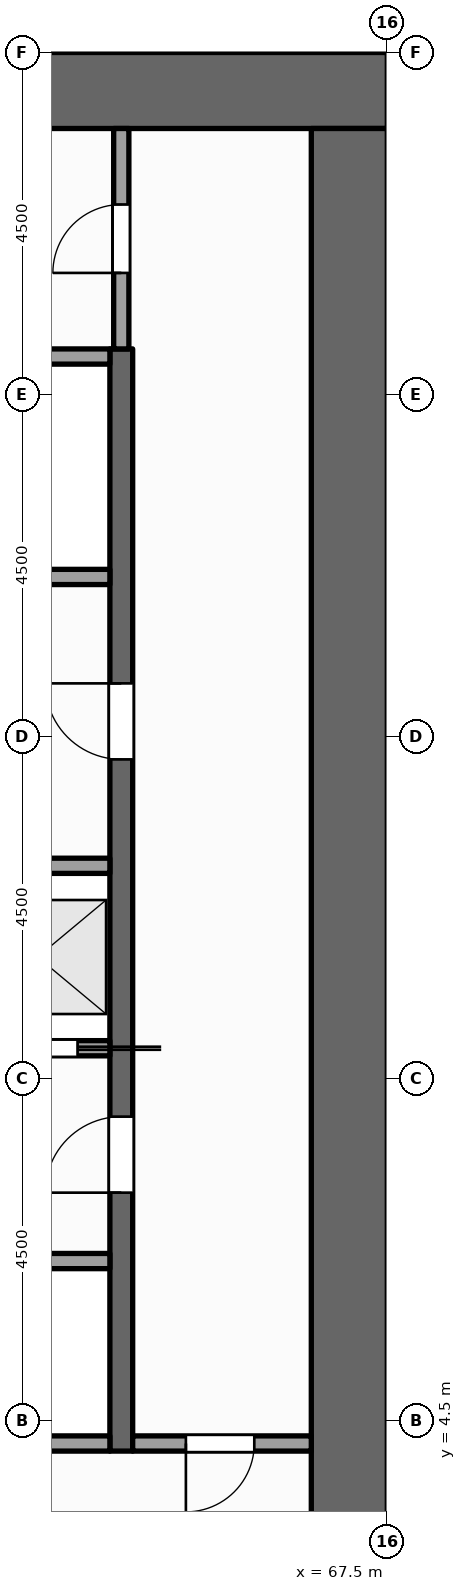
"""IFC4 building model, lengths in metres.
Left out: names, types, materials, properties, quantities, classifications, styles, units other than length and angle.
Written with IfcOpenShell. Run it as: python <this file> out.ifc"""

import sys

from ifc_helpers import new_model, si_unit, direction, frame, frame_2d, origin, place, context, subcontext, project, spatial, rectangle, extrude, element, fill, save


model = new_model("IFC4")
c1 = context("Model", 3, precision=1e-05, world=origin(), true_north=direction((0.0, 1.0)))
c2 = subcontext(c1, "Body", "Model", "MODEL_VIEW")
j1 = project(units=[si_unit("LENGTHUNIT", "METRE"), si_unit("PLANEANGLEUNIT", "RADIAN")], contexts=[c1])
p1 = place(None, origin())
s1 = spatial("IfcSite", under=j1, at=p1, CompositionType="ELEMENT")
p2 = place(p1, origin())
s2 = spatial("IfcBuilding", under=s1, at=p2, CompositionType="ELEMENT")
p3 = place(p2, frame((0.0, 0.0, 139.0)))
s3 = spatial("IfcBuildingStorey", under=s2, at=p3, CompositionType="ELEMENT", Elevation=139.0)
p4 = place(p3, frame((54.0, 22.0, -0.15), z_axis=(0.0, 0.0, 1.0), x_axis=(1.0, 0.0, 0.0)))
e1 = element("IfcWall", 1, at=p4, inside=s3, PredefinedType="SHEAR", context=c2, shape_type="SweptSolid", body=[
    extrude(rectangle(XDim=13.5, YDim=1.0, at=frame_2d((6.75, 0.0))), origin(), (0.0, 0.0, 1.0), 4.0),
])
p5 = place(p3, frame((67.0, 1.0, -0.15), z_axis=(0.0, 0.0, 1.0), x_axis=(0.0, 1.0, 0.0)))
e2 = element("IfcWall", 2, at=p5, inside=s3, PredefinedType="SHEAR", context=c2, shape_type="SweptSolid", body=[
    extrude(rectangle(XDim=20.5, YDim=1.0, at=frame_2d((10.25, 0.0))), origin(), (0.0, 0.0, 1.0), 4.0),
])
p6 = place(p3, frame((64.0, 4.1, 0.0), z_axis=(0.0, 0.0, 1.0), x_axis=(0.0, 1.0, 0.0)))
e3 = element("IfcWall", 3, at=p6, inside=s3, PredefinedType="SHEAR", context=c2, shape_type="SweptSolid", body=[
    extrude(rectangle(XDim=14.5, YDim=0.3, at=frame_2d((7.25, 0.0))), origin(), (0.0, 0.0, 1.0), 3.85),
])
p7 = place(p6, frame((3.4, 0.0, 0.0)))
e4 = element("IfcOpeningElement", 4, at=p7, cuts=e3, PredefinedType="OPENING", context=c2, shape_type="SweptSolid", body=[
    extrude(rectangle(XDim=1.0, YDim=2.1, at=frame_2d((0.5, 1.05))), frame((0.0, 0.16, 0.0), z_axis=(0.0, -1.0, 0.0), x_axis=(1.0, 0.0, 0.0)), (0.0, 0.0, 1.0), 0.32),
])
p8 = place(p6, frame((9.1, 0.0, 0.0)))
e5 = element("IfcOpeningElement", 5, at=p8, cuts=e3, PredefinedType="OPENING", context=c2, shape_type="SweptSolid", body=[
    extrude(rectangle(XDim=1.0, YDim=2.1, at=frame_2d((0.5, 1.05))), frame((0.0, 0.16, 0.0), z_axis=(0.0, -1.0, 0.0), x_axis=(1.0, 0.0, 0.0)), (0.0, 0.0, 1.0), 0.32),
])
p9 = place(p3, frame((64.0, 18.6, 0.0), z_axis=(0.0, 0.0, 1.0), x_axis=(0.0, 1.0, 0.0)))
e6 = element("IfcWall", 6, at=p9, inside=s3, PredefinedType="PARTITIONING", context=c2, shape_type="SweptSolid", body=[
    extrude(rectangle(XDim=2.9, YDim=0.2, at=frame_2d((1.45, 0.0))), origin(), (0.0, 0.0, 1.0), 3.85),
])
p10 = place(p9, frame((1.0, 0.0, 0.0)))
e7 = element("IfcOpeningElement", 7, at=p10, cuts=e6, PredefinedType="OPENING", context=c2, shape_type="SweptSolid", body=[
    extrude(rectangle(XDim=0.9, YDim=2.1, at=frame_2d((0.45, 1.05))), frame((0.0, 0.11, 0.0), z_axis=(0.0, -1.0, 0.0), x_axis=(1.0, 0.0, 0.0)), (0.0, 0.0, 1.0), 0.22),
])
p11 = place(p3, frame((61.9, 4.2, 0.0), z_axis=(0.0, 0.0, 1.0), x_axis=(1.0, 0.0, 0.0)))
e8 = element("IfcWall", 8, at=p11, inside=s3, PredefinedType="SOLIDWALL", context=c2, shape_type="SweptSolid", body=[
    extrude(rectangle(XDim=1.95, YDim=0.2, at=frame_2d((0.975, 0.0))), origin(), (0.0, 0.0, 1.0), 3.85),
])
p12 = place(p3, frame((64.15, 4.2, 0.0), z_axis=(0.0, 0.0, 1.0), x_axis=(1.0, 0.0, 0.0)))
e9 = element("IfcWall", 9, at=p12, inside=s3, PredefinedType="PARTITIONING", context=c2, shape_type="SweptSolid", body=[
    extrude(rectangle(XDim=2.35, YDim=0.2, at=frame_2d((1.175, 0.0))), origin(), (0.0, 0.0, 1.0), 3.85),
])
p13 = place(p12, frame((0.7, 0.0, 0.0)))
e10 = element("IfcOpeningElement", 10, at=p13, cuts=e9, PredefinedType="OPENING", context=c2, shape_type="SweptSolid", body=[
    extrude(rectangle(XDim=0.9, YDim=2.1, at=frame_2d((0.45, 1.05))), frame((0.0, 0.11, 0.0), z_axis=(0.0, -1.0, 0.0), x_axis=(1.0, 0.0, 0.0)), (0.0, 0.0, 1.0), 0.22),
])
p14 = place(p3, frame((61.9, 6.6, 0.0), z_axis=(0.0, 0.0, 1.0), x_axis=(1.0, 0.0, 0.0)))
e11 = element("IfcWall", 11, at=p14, inside=s3, PredefinedType="SOLIDWALL", context=c2, shape_type="SweptSolid", body=[
    extrude(rectangle(XDim=1.95, YDim=0.2, at=frame_2d((0.975, 0.0))), origin(), (0.0, 0.0, 1.0), 3.85),
])
p15 = place(p3, frame((61.9, 9.4, 0.0), z_axis=(0.0, 0.0, 1.0), x_axis=(1.0, 0.0, 0.0)))
e12 = element("IfcWall", 12, at=p15, inside=s3, PredefinedType="SOLIDWALL", context=c2, shape_type="SweptSolid", body=[
    extrude(rectangle(XDim=1.95, YDim=0.2, at=frame_2d((0.975, 0.0))), origin(), (0.0, 0.0, 1.0), 3.85),
])
p16 = place(p15, frame((0.425, 0.0, 0.012)))
e13 = element("IfcOpeningElement", 13, at=p16, cuts=e12, PredefinedType="OPENING", context=c2, shape_type="SweptSolid", body=[
    extrude(rectangle(XDim=1.1, YDim=2.1, at=frame_2d((0.55, 1.05))), frame((0.0, 0.11, 0.0), z_axis=(0.0, -1.0, 0.0), x_axis=(1.0, 0.0, 0.0)), (0.0, 0.0, 1.0), 0.22),
])
for number, where, z_axis, x_axis in (
    (14, (61.9, 11.8, 0.0), (0.0, 0.0, 1.0), (1.0, 0.0, 0.0)),
    (15, (61.9, 15.6, 0.0), (0.0, 0.0, 1.0), (1.0, 0.0, 0.0)),
    (16, (61.9, 18.5, 0.0), (0.0, 0.0, 1.0), (1.0, 0.0, 0.0)),
):
    element("IfcWall", number, at=place(p3, frame(where, z_axis=z_axis, x_axis=x_axis)), inside=s3, PredefinedType="SOLIDWALL", context=c2, shape_type="SweptSolid", body=[
        extrude(rectangle(XDim=1.95, YDim=0.2, at=frame_2d((0.975, 0.0))), origin(), (0.0, 0.0, 1.0), 3.85),
    ])
p17 = place(p16, origin())
e17 = element("IfcDoor", 17, at=p17, inside=s3, OperationType="SLIDING_TO_RIGHT", PredefinedType="DOOR", context=c2, shape_type="SweptSolid", body=[
    extrude(rectangle(XDim=1.1, YDim=2.1, at=frame_2d((0.55, 1.05))), frame((0.0, 0.025, 0.0), z_axis=(0.0, -1.0, 0.0), x_axis=(1.0, 0.0, 0.0)), (0.0, 0.0, 1.0), 0.05),
])
fill(e13, e17)
p18 = place(p7, origin())
e18 = element("IfcDoor", 18, at=p18, inside=s3, OperationType="SINGLE_SWING_LEFT", PredefinedType="DOOR", context=c2, shape_type="SweptSolid", body=[
    extrude(rectangle(XDim=1.0, YDim=2.1, at=frame_2d((0.5, 1.05))), frame((0.0, 0.025, 0.0), z_axis=(0.0, -1.0, 0.0), x_axis=(1.0, 0.0, 0.0)), (0.0, 0.0, 1.0), 0.05),
])
fill(e4, e18)
p19 = place(p8, origin())
e19 = element("IfcDoor", 19, at=p19, inside=s3, OperationType="SINGLE_SWING_RIGHT", PredefinedType="DOOR", context=c2, shape_type="SweptSolid", body=[
    extrude(rectangle(XDim=1.0, YDim=2.1, at=frame_2d((0.5, 1.05))), frame((0.0, 0.025, 0.0), z_axis=(0.0, -1.0, 0.0), x_axis=(1.0, 0.0, 0.0)), (0.0, 0.0, 1.0), 0.05),
])
fill(e5, e19)
p20 = place(p13, origin())
e20 = element("IfcDoor", 20, at=p20, inside=s3, OperationType="SINGLE_SWING_LEFT", PredefinedType="DOOR", context=c2, shape_type="SweptSolid", body=[
    extrude(rectangle(XDim=0.9, YDim=2.1, at=frame_2d((0.45, 1.05))), frame((0.0, 0.025, 0.0), z_axis=(0.0, -1.0, 0.0), x_axis=(1.0, 0.0, 0.0)), (0.0, 0.0, 1.0), 0.05),
])
fill(e10, e20)
p21 = place(p10, origin())
e21 = element("IfcDoor", 21, at=p21, inside=s3, OperationType="SINGLE_SWING_LEFT", PredefinedType="DOOR", context=c2, shape_type="SweptSolid", body=[
    extrude(rectangle(XDim=0.9, YDim=2.1, at=frame_2d((0.45, 1.05))), frame((0.0, 0.025, 0.0), z_axis=(0.0, -1.0, 0.0), x_axis=(1.0, 0.0, 0.0)), (0.0, 0.0, 1.0), 0.05),
])
fill(e7, e21)
save(model, sys.argv[1])
